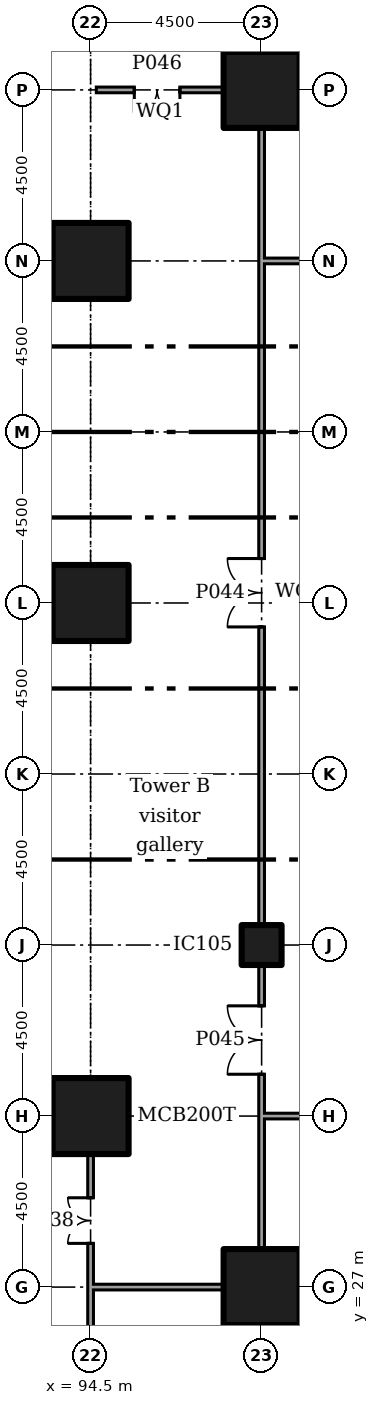
"""IFC4 building model, lengths in metres.
Left out: names, types, materials, properties, quantities, classifications, styles, units other than length and angle.
Written with IfcOpenShell. Run it as: python <this file> out.ifc"""

import sys

from ifc_helpers import new_model, si_unit, direction, frame, frame_2d, origin, origin_2d, place, context, subcontext, project, spatial, rectangle, extrude, element, fill, save


model = new_model("IFC4")
c1 = context("Model", 3, precision=1e-05, world=origin(), true_north=direction((0.0, 1.0)))
c2 = subcontext(c1, "Body", "Model", "MODEL_VIEW")
j1 = project(units=[si_unit("LENGTHUNIT", "METRE"), si_unit("PLANEANGLEUNIT", "RADIAN")], contexts=[c1])
p1 = place(None, origin())
s1 = spatial("IfcSite", under=j1, at=p1, CompositionType="ELEMENT")
p2 = place(p1, origin())
s2 = spatial("IfcBuilding", under=s1, at=p2, CompositionType="ELEMENT")
p3 = place(p2, frame((0.0, 0.0, 11.5)))
s3 = spatial("IfcBuildingStorey", under=s2, at=p3, CompositionType="ELEMENT", Elevation=11.5)
for number, where in (
    (1, (94.5, 31.5, 0.0)),
    (2, (94.5, 45.0, 0.0)),
    (3, (94.5, 54.0, 0.0)),
    (4, (99.0, 27.0, 0.0)),
    (5, (99.0, 58.5, 0.0)),
):
    element("IfcColumn", number, at=place(p3, frame(where)), inside=s3, PredefinedType="COLUMN", context=c2, shape_type="SweptSolid", body=[
        extrude(rectangle(XDim=2.0, YDim=2.0, at=origin_2d()), origin(), (0.0, 0.0, 1.0), 5.0),
    ])
p4 = place(p3, frame((99.0, 36.0, 0.0)))
e6 = element("IfcColumn", 6, at=p4, inside=s3, PredefinedType="COLUMN", context=c2, shape_type="SweptSolid", body=[
    extrude(rectangle(XDim=1.05, YDim=1.05, at=origin_2d()), origin(), (0.0, 0.0, 1.0), 5.0),
])
p5 = place(p2, frame((0.0, 0.0, 6.0)))
s4 = spatial("IfcBuildingStorey", under=s2, at=p5, CompositionType="ELEMENT", Elevation=6.0)
p6 = place(p5, frame((94.5, 32.495, 0.0), z_axis=(0.0, 0.0, 1.0), x_axis=(0.0, 1.0, 0.0)))
e7 = element("IfcWall", 7, at=p6, inside=s4, PredefinedType="SOLIDWALL", context=c2, shape_type="SweptSolid", body=[
    extrude(rectangle(XDim=11.51, YDim=0.3, at=frame_2d((5.755, 0.0))), origin(), (0.0, 0.0, 1.0), 10.05),
])
p7 = place(p6, frame((4.85, 0.0, 0.0)))
e8 = element("IfcOpeningElement", 8, at=p7, cuts=e7, PredefinedType="OPENING", context=c2, shape_type="SweptSolid", body=[
    extrude(rectangle(XDim=1.8, YDim=2.1, at=frame_2d((0.9, 1.05))), frame((0.0, 0.16, 0.0), z_axis=(0.0, -1.0, 0.0), x_axis=(1.0, 0.0, 0.0)), (0.0, 0.0, 1.0), 0.32),
])
p8 = place(p5, frame((94.5, 45.995, 0.0), z_axis=(0.0, 0.0, 1.0), x_axis=(0.0, 1.0, 0.0)))
e9 = element("IfcWall", 9, at=p8, inside=s4, PredefinedType="SOLIDWALL", context=c2, shape_type="SweptSolid", body=[
    extrude(rectangle(XDim=7.01, YDim=0.3, at=frame_2d((3.505, 0.0))), origin(), (0.0, 0.0, 1.0), 10.05),
])
p9 = place(p8, frame((2.6, 0.0, 0.0)))
e10 = element("IfcOpeningElement", 10, at=p9, cuts=e9, PredefinedType="OPENING", context=c2, shape_type="SweptSolid", body=[
    extrude(rectangle(XDim=1.8, YDim=2.1, at=frame_2d((0.9, 1.05))), frame((0.0, 0.16, 0.0), z_axis=(0.0, -1.0, 0.0), x_axis=(1.0, 0.0, 0.0)), (0.0, 0.0, 1.0), 0.32),
])
p10 = place(p5, frame((94.5, 54.995, 0.0), z_axis=(0.0, 0.0, 1.0), x_axis=(0.0, 1.0, 0.0)))
e11 = element("IfcWall", 11, at=p10, inside=s4, PredefinedType="SOLIDWALL", context=c2, shape_type="SweptSolid", body=[
    extrude(rectangle(XDim=3.58, YDim=0.3, at=frame_2d((1.79, 0.0))), origin(), (0.0, 0.0, 1.0), 10.05),
])
p11 = place(p5, frame((94.5, 58.425, 0.0), z_axis=(0.0, 0.0, 1.0), x_axis=(0.0, 1.0, 0.0)))
e12 = element("IfcWall", 12, at=p11, inside=s4, PredefinedType="SOLIDWALL", context=c2, shape_type="SweptSolid", body=[
    extrude(rectangle(XDim=8.925, YDim=0.3, at=frame_2d((4.462, 0.0))), origin(), (0.0, 0.0, 1.0), 10.05),
])
p12 = place(p3, frame((94.5, 26.925, 0.0), z_axis=(0.0, 0.0, 1.0), x_axis=(0.0, 1.0, 0.0)))
e13 = element("IfcWall", 13, at=p12, inside=s3, PredefinedType="PARTITIONING", context=c2, shape_type="SweptSolid", body=[
    extrude(rectangle(XDim=3.58, YDim=0.15, at=frame_2d((1.79, 0.0))), origin(), (0.0, 0.0, 1.0), 4.55),
])
p13 = place(p12, frame((1.225, 0.0, 0.0)))
e14 = element("IfcOpeningElement", 14, at=p13, cuts=e13, PredefinedType="OPENING", context=c2, shape_type="SweptSolid", body=[
    extrude(rectangle(XDim=1.2, YDim=2.1, at=frame_2d((0.6, 1.05))), frame((0.0, 0.085, 0.0), z_axis=(0.0, -1.0, 0.0), x_axis=(1.0, 0.0, 0.0)), (0.0, 0.0, 1.0), 0.17),
])
p14 = place(p3, frame((94.5, 22.575, 0.0), z_axis=(0.0, 0.0, 1.0), x_axis=(0.0, 1.0, 0.0)))
e15 = element("IfcWall", 15, at=p14, inside=s3, PredefinedType="PARTITIONING", context=c2, shape_type="SweptSolid", body=[
    extrude(rectangle(XDim=4.425, YDim=0.15, at=frame_2d((2.212, 0.0))), origin(), (0.0, 0.0, 1.0), 4.55),
])
p15 = place(p3, frame((99.0, 31.425, 0.0), z_axis=(0.0, 0.0, 1.0), x_axis=(0.0, 1.0, 0.0)))
e16 = element("IfcWall", 16, at=p15, inside=s3, PredefinedType="PARTITIONING", context=c2, shape_type="SweptSolid", body=[
    extrude(rectangle(XDim=4.055, YDim=0.15, at=frame_2d((2.027, 0.0))), origin(), (0.0, 0.0, 1.0), 4.55),
])
p16 = place(p15, frame((1.175, 0.0, 0.0)))
e17 = element("IfcOpeningElement", 17, at=p16, cuts=e16, PredefinedType="OPENING", context=c2, shape_type="SweptSolid", body=[
    extrude(rectangle(XDim=1.8, YDim=2.1, at=frame_2d((0.9, 1.05))), frame((0.0, 0.085, 0.0), z_axis=(0.0, -1.0, 0.0), x_axis=(1.0, 0.0, 0.0)), (0.0, 0.0, 1.0), 0.17),
])
p17 = place(p3, frame((99.0, 36.52, 0.0), z_axis=(0.0, 0.0, 1.0), x_axis=(0.0, 1.0, 0.0)))
e18 = element("IfcWall", 18, at=p17, inside=s3, PredefinedType="PARTITIONING", context=c2, shape_type="SweptSolid", body=[
    extrude(rectangle(XDim=17.555, YDim=0.15, at=frame_2d((8.777, 0.0))), origin(), (0.0, 0.0, 1.0), 4.55),
])
p18 = place(p17, frame((7.85, 0.0, 0.0)))
e19 = element("IfcOpeningElement", 19, at=p18, cuts=e18, PredefinedType="OPENING", context=c2, shape_type="SweptSolid", body=[
    extrude(rectangle(XDim=1.8, YDim=2.1, at=frame_2d((0.9, 1.05))), frame((0.0, 0.085, 0.0), z_axis=(0.0, -1.0, 0.0), x_axis=(1.0, 0.0, 0.0)), (0.0, 0.0, 1.0), 0.17),
])
for number, where, z_axis, x_axis in (
    (20, (99.0, 27.995, 0.0), (0.0, 0.0, 1.0), (0.0, 1.0, 0.0)),
    (21, (99.0, 54.0, 0.0), (0.0, 0.0, 1.0), (0.0, 1.0, 0.0)),
):
    element("IfcWall", number, at=place(p3, frame(where, z_axis=z_axis, x_axis=x_axis)), inside=s3, PredefinedType="PARTITIONING", context=c2, shape_type="SweptSolid", body=[
        extrude(rectangle(XDim=3.505, YDim=0.15, at=frame_2d((1.752, 0.0))), origin(), (0.0, 0.0, 1.0), 4.55),
    ])
p19 = place(p3, frame((94.575, 27.0, 0.0)))
e22 = element("IfcWall", 22, at=p19, inside=s3, PredefinedType="PARTITIONING", context=c2, shape_type="SweptSolid", body=[
    extrude(rectangle(XDim=3.43, YDim=0.15, at=frame_2d((1.715, 0.0))), origin(), (0.0, 0.0, 1.0), 4.55),
])
p20 = place(p3, frame((94.65, 58.5, 0.0)))
e23 = element("IfcWall", 23, at=p20, inside=s3, PredefinedType="PARTITIONING", context=c2, shape_type="SweptSolid", body=[
    extrude(rectangle(XDim=3.355, YDim=0.15, at=frame_2d((1.677, 0.0))), origin(), (0.0, 0.0, 1.0), 4.55),
])
p21 = place(p20, frame((1.0, 0.0, 0.0)))
e24 = element("IfcOpeningElement", 24, at=p21, cuts=e23, PredefinedType="OPENING", context=c2, shape_type="SweptSolid", body=[
    extrude(rectangle(XDim=1.2, YDim=2.1, at=frame_2d((0.6, 1.05))), frame((0.0, 0.085, 0.0), z_axis=(0.0, -1.0, 0.0), x_axis=(1.0, 0.0, 0.0)), (0.0, 0.0, 1.0), 0.17),
])
p22 = place(p3, frame((99.075, 31.5, 0.0)))
e25 = element("IfcWall", 25, at=p22, inside=s3, PredefinedType="PARTITIONING", context=c2, shape_type="SweptSolid", body=[
    extrude(rectangle(XDim=17.405, YDim=0.15, at=frame_2d((8.703, 0.0))), origin(), (0.0, 0.0, 1.0), 4.55),
])
p23 = place(p22, frame((8.175, 0.0, 0.0)))
e26 = element("IfcOpeningElement", 26, at=p23, cuts=e25, PredefinedType="OPENING", context=c2, shape_type="SweptSolid", body=[
    extrude(rectangle(XDim=1.0, YDim=2.1, at=frame_2d((0.5, 1.05))), frame((0.0, 0.085, 0.0), z_axis=(0.0, -1.0, 0.0), x_axis=(1.0, 0.0, 0.0)), (0.0, 0.0, 1.0), 0.17),
])
p24 = place(p3, frame((99.075, 54.0, 0.0)))
e27 = element("IfcWall", 27, at=p24, inside=s3, PredefinedType="PARTITIONING", context=c2, shape_type="SweptSolid", body=[
    extrude(rectangle(XDim=3.905, YDim=0.15, at=frame_2d((1.953, 0.0))), origin(), (0.0, 0.0, 1.0), 4.55),
])
for number, where in (
    (28, (99.995, 27.0, 0.0)),
    (29, (99.995, 58.5, 0.0)),
):
    element("IfcWall", number, at=place(p3, frame(where)), inside=s3, PredefinedType="PARTITIONING", context=c2, shape_type="SweptSolid", body=[
        extrude(rectangle(XDim=11.51, YDim=0.15, at=frame_2d((5.755, 0.0))), origin(), (0.0, 0.0, 1.0), 4.55),
    ])
p25 = place(p13, origin())
e30 = element("IfcDoor", 30, at=p25, inside=s3, OperationType="DOUBLE_DOOR_SINGLE_SWING", PredefinedType="DOOR", context=c2, shape_type="SweptSolid", body=[
    extrude(rectangle(XDim=1.2, YDim=2.1, at=frame_2d((0.6, 1.05))), frame((0.0, 0.025, 0.0), z_axis=(0.0, -1.0, 0.0), x_axis=(1.0, 0.0, 0.0)), (0.0, 0.0, 1.0), 0.05),
])
fill(e14, e30)
p26 = place(p18, origin())
e31 = element("IfcDoor", 31, at=p26, inside=s3, OperationType="DOUBLE_DOOR_SINGLE_SWING", PredefinedType="DOOR", context=c2, shape_type="SweptSolid", body=[
    extrude(rectangle(XDim=1.8, YDim=2.1, at=frame_2d((0.9, 1.05))), frame((0.0, 0.025, 0.0), z_axis=(0.0, -1.0, 0.0), x_axis=(1.0, 0.0, 0.0)), (0.0, 0.0, 1.0), 0.05),
])
fill(e19, e31)
p27 = place(p16, origin())
e32 = element("IfcDoor", 32, at=p27, inside=s3, OperationType="DOUBLE_DOOR_SINGLE_SWING", PredefinedType="DOOR", context=c2, shape_type="SweptSolid", body=[
    extrude(rectangle(XDim=1.8, YDim=2.1, at=frame_2d((0.9, 1.05))), frame((0.0, 0.025, 0.0), z_axis=(0.0, -1.0, 0.0), x_axis=(1.0, 0.0, 0.0)), (0.0, 0.0, 1.0), 0.05),
])
fill(e17, e32)
p28 = place(p21, frame((1.2, 0.0, 0.0), x_axis=(-1.0, 0.0, 0.0)))
e33 = element("IfcDoor", 33, at=p28, inside=s3, OperationType="DOUBLE_DOOR_SINGLE_SWING", PredefinedType="DOOR", context=c2, shape_type="SweptSolid", body=[
    extrude(rectangle(XDim=1.2, YDim=2.1, at=frame_2d((0.6, 1.05))), frame((0.0, 0.025, 0.0), z_axis=(0.0, -1.0, 0.0), x_axis=(1.0, 0.0, 0.0)), (0.0, 0.0, 1.0), 0.05),
])
fill(e24, e33)
save(model, sys.argv[1])
